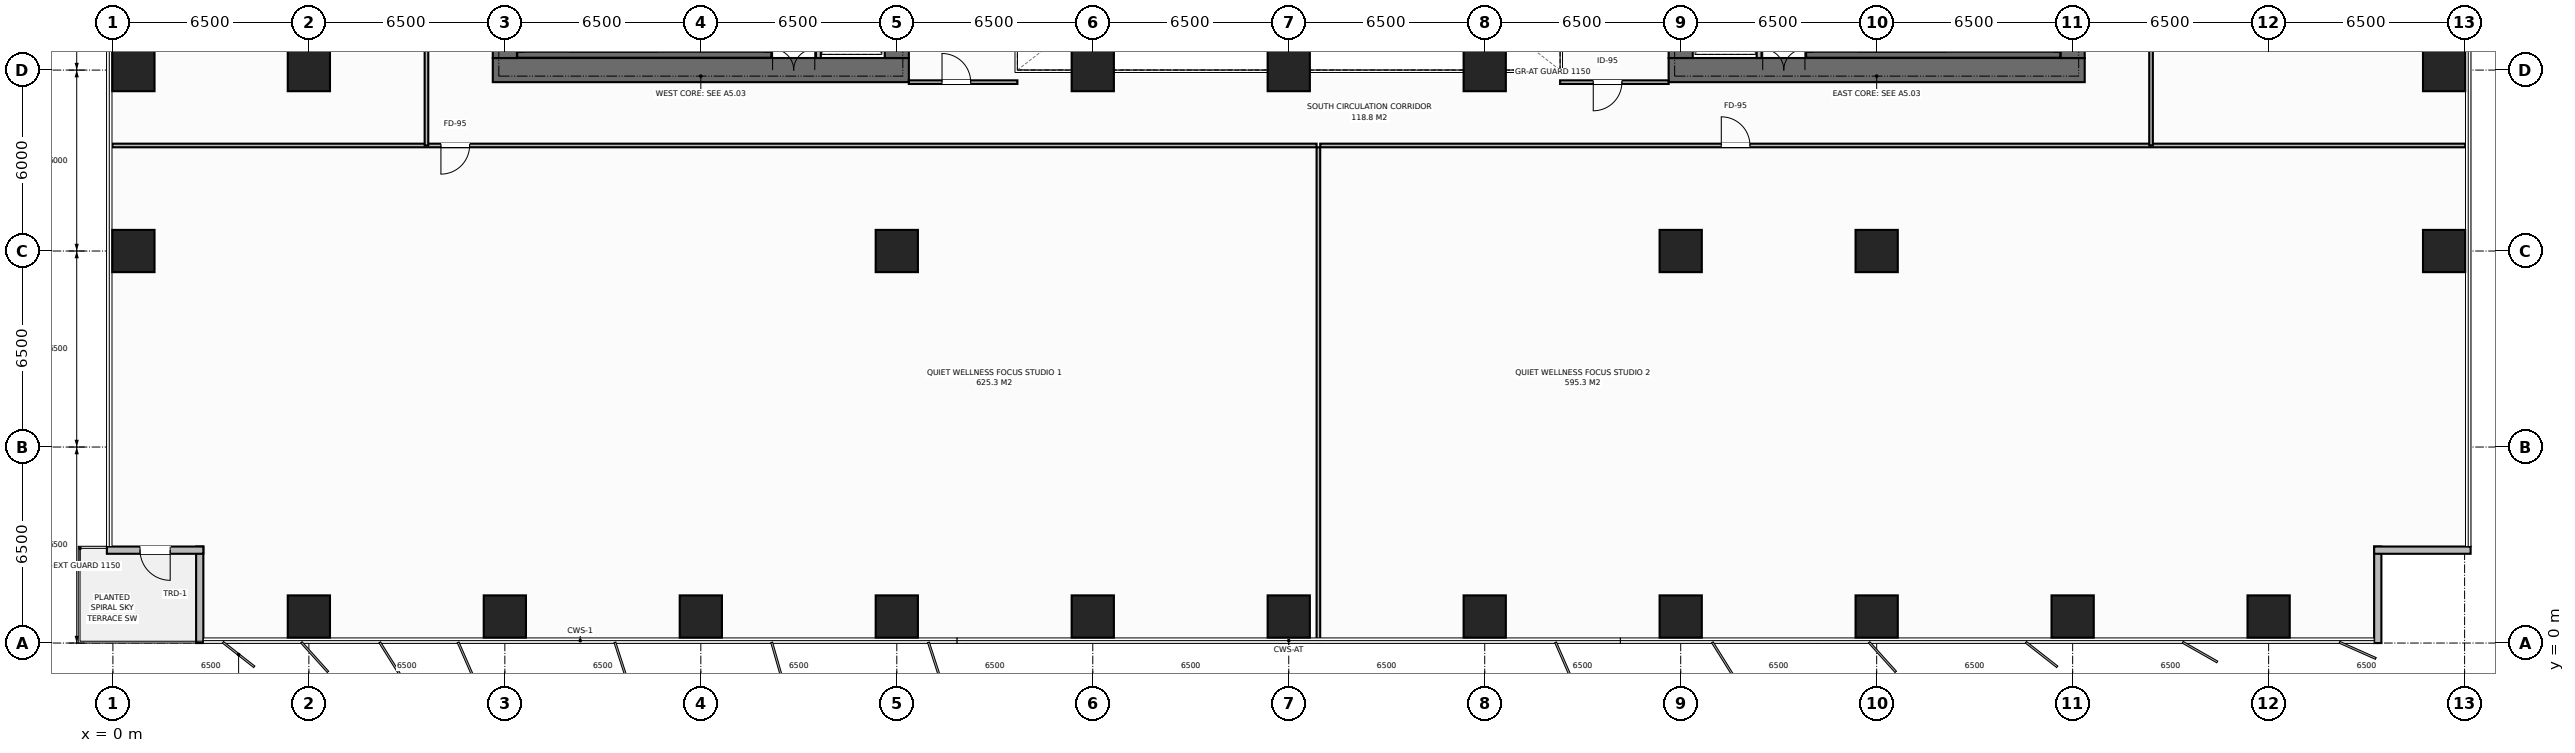
"""IFC4 building model, lengths in metres.
Left out: names, types, materials, properties, quantities, classifications, styles, units other than length and angle.
Written with IfcOpenShell. Run it as: python <this file> out.ifc"""

import sys

from ifc_helpers import new_model, si_unit, direction, frame, frame_2d, origin, origin_2d, place, context, subcontext, project, spatial, rectangle, extrude, element, fill, save


model = new_model("IFC4")
c1 = context("Model", 3, precision=1e-05, world=origin(), true_north=direction((0.0, 1.0)))
c2 = subcontext(c1, "Body", "Model", "MODEL_VIEW")
j1 = project(units=[si_unit("LENGTHUNIT", "METRE"), si_unit("PLANEANGLEUNIT", "RADIAN")], contexts=[c1])
p1 = place(None, origin())
s1 = spatial("IfcSite", under=j1, at=p1, CompositionType="ELEMENT")
p2 = place(p1, origin())
s2 = spatial("IfcBuilding", under=s1, at=p2, CompositionType="ELEMENT")
p3 = place(p2, frame((0.0, 0.0, 35.4)))
s3 = spatial("IfcBuildingStorey", under=s2, at=p3, CompositionType="ELEMENT", Elevation=35.4)
p4 = place(p3, frame((12.6, 19.0, 0.0), z_axis=(0.0, 0.0, 1.0), x_axis=(1.0, 0.0, 0.0)))
e1 = element("IfcWall", 1, at=p4, inside=s3, PredefinedType="SHEAR", context=c2, shape_type="SweptSolid", body=[
    extrude(rectangle(XDim=13.8, YDim=0.8, at=frame_2d((6.9, 0.0))), origin(), (0.0, 0.0, 1.0), 3.8),
])
p5 = place(p4, frame((9.28, 0.0, 0.0)))
e2 = element("IfcOpeningElement", 2, at=p5, cuts=e1, PredefinedType="OPENING", context=c2, shape_type="SweptSolid", body=[
    extrude(rectangle(XDim=1.4, YDim=2.2, at=frame_2d((0.7, 1.1))), frame((0.0, 0.41, 0.0), z_axis=(0.0, -1.0, 0.0), x_axis=(1.0, 0.0, 0.0)), (0.0, 0.0, 1.0), 0.82),
])
p6 = place(p3, frame((13.0, 19.4, 0.0), z_axis=(0.0, 0.0, 1.0), x_axis=(0.0, 1.0, 0.0)))
e3 = element("IfcWall", 3, at=p6, inside=s3, PredefinedType="SHEAR", context=c2, shape_type="SweptSolid", body=[
    extrude(rectangle(XDim=13.2, YDim=0.8, at=frame_2d((6.6, 0.0))), origin(), (0.0, 0.0, 1.0), 3.8),
])
p7 = place(p6, frame((4.65, 0.0, 0.0)))
e4 = element("IfcOpeningElement", 4, at=p7, cuts=e3, PredefinedType="OPENING", context=c2, shape_type="SweptSolid", body=[
    extrude(rectangle(XDim=1.4, YDim=2.2, at=frame_2d((0.7, 1.1))), frame((0.0, 0.41, 0.0), z_axis=(0.0, -1.0, 0.0), x_axis=(1.0, 0.0, 0.0)), (0.0, 0.0, 1.0), 0.82),
])
p8 = place(p3, frame((26.0, 19.4, 0.0), z_axis=(0.0, 0.0, 1.0), x_axis=(0.0, 1.0, 0.0)))
e5 = element("IfcWall", 5, at=p8, inside=s3, PredefinedType="SHEAR", context=c2, shape_type="SweptSolid", body=[
    extrude(rectangle(XDim=13.2, YDim=0.8, at=frame_2d((6.6, 0.0))), origin(), (0.0, 0.0, 1.0), 3.8),
])
p9 = place(p3, frame((51.6, 19.0, 0.0), z_axis=(0.0, 0.0, 1.0), x_axis=(1.0, 0.0, 0.0)))
e6 = element("IfcWall", 6, at=p9, inside=s3, PredefinedType="SHEAR", context=c2, shape_type="SweptSolid", body=[
    extrude(rectangle(XDim=13.8, YDim=0.8, at=frame_2d((6.9, 0.0))), origin(), (0.0, 0.0, 1.0), 3.8),
])
p10 = place(p9, frame((3.12, 0.0, 0.0)))
e7 = element("IfcOpeningElement", 7, at=p10, cuts=e6, PredefinedType="OPENING", context=c2, shape_type="SweptSolid", body=[
    extrude(rectangle(XDim=1.4, YDim=2.2, at=frame_2d((0.7, 1.1))), frame((0.0, 0.41, 0.0), z_axis=(0.0, -1.0, 0.0), x_axis=(1.0, 0.0, 0.0)), (0.0, 0.0, 1.0), 0.82),
])
p11 = place(p3, frame((52.0, 19.4, 0.0), z_axis=(0.0, 0.0, 1.0), x_axis=(0.0, 1.0, 0.0)))
e8 = element("IfcWall", 8, at=p11, inside=s3, PredefinedType="SHEAR", context=c2, shape_type="SweptSolid", body=[
    extrude(rectangle(XDim=13.2, YDim=0.8, at=frame_2d((6.6, 0.0))), origin(), (0.0, 0.0, 1.0), 3.8),
])
p12 = place(p3, frame((65.0, 19.4, 0.0), z_axis=(0.0, 0.0, 1.0), x_axis=(0.0, 1.0, 0.0)))
e9 = element("IfcWall", 9, at=p12, inside=s3, PredefinedType="SHEAR", context=c2, shape_type="SweptSolid", body=[
    extrude(rectangle(XDim=13.2, YDim=0.8, at=frame_2d((6.6, 0.0))), origin(), (0.0, 0.0, 1.0), 3.8),
])
p13 = place(p12, frame((8.05, 0.0, 0.0)))
e10 = element("IfcOpeningElement", 10, at=p13, cuts=e9, PredefinedType="OPENING", context=c2, shape_type="SweptSolid", body=[
    extrude(rectangle(XDim=1.3, YDim=2.2, at=frame_2d((0.65, 1.1))), frame((0.0, 0.41, 0.0), z_axis=(0.0, -1.0, 0.0), x_axis=(1.0, 0.0, 0.0)), (0.0, 0.0, 1.0), 0.82),
])
for number, where, z_axis, x_axis in (
    (11, (13.41, 19.51, 0.0), (0.0, 0.0, 1.0), (1.0, 0.0, 0.0)),
    (12, (56.16, 19.51, 0.0), (0.0, 0.0, 1.0), (1.0, 0.0, 0.0)),
):
    element("IfcWall", number, at=place(p3, frame(where, z_axis=z_axis, x_axis=x_axis)), inside=s3, PredefinedType="SHEAR", context=c2, shape_type="SweptSolid", body=[
        extrude(rectangle(XDim=8.43, YDim=0.2, at=frame_2d((4.215, 0.0))), origin(), (0.0, 0.0, 1.0), 3.8),
    ])
for number, where, z_axis, x_axis in (
    (13, (58.5, 13.0, 0.0), (0.0, 0.0, 1.0), (1.0, 0.0, 0.0)),
    (14, (6.5, 19.0, 0.0), (0.0, 0.0, 1.0), (1.0, 0.0, 0.0)),
    (15, (32.5, 19.0, 0.0), (0.0, 0.0, 1.0), (1.0, 0.0, 0.0)),
    (16, (39.0, 19.0, 0.0), (0.0, 0.0, 1.0), (1.0, 0.0, 0.0)),
    (17, (45.5, 19.0, 0.0), (0.0, 0.0, 1.0), (1.0, 0.0, 0.0)),
    (18, (26.0, 13.0, 0.0), (0.0, 0.0, 1.0), (1.0, 0.0, 0.0)),
    (19, (52.0, 13.0, 0.0), (0.0, 0.0, 1.0), (1.0, 0.0, 0.0)),
    (20, (6.5, 0.88, 0.0), (0.0, 0.0, 1.0), (1.0, 0.0, 0.0)),
    (21, (13.0, 0.88, 0.0), (0.0, 0.0, 1.0), (1.0, 0.0, 0.0)),
    (22, (19.5, 0.88, 0.0), (0.0, 0.0, 1.0), (1.0, 0.0, 0.0)),
    (23, (26.0, 0.88, 0.0), (0.0, 0.0, 1.0), (1.0, 0.0, 0.0)),
    (24, (32.5, 0.88, 0.0), (0.0, 0.0, 1.0), (1.0, 0.0, 0.0)),
    (25, (39.0, 0.88, 0.0), (0.0, 0.0, 1.0), (1.0, 0.0, 0.0)),
    (26, (45.5, 0.88, 0.0), (0.0, 0.0, 1.0), (1.0, 0.0, 0.0)),
    (27, (52.0, 0.88, 0.0), (0.0, 0.0, 1.0), (1.0, 0.0, 0.0)),
    (28, (58.5, 0.88, 0.0), (0.0, 0.0, 1.0), (1.0, 0.0, 0.0)),
    (29, (65.0, 0.88, 0.0), (0.0, 0.0, 1.0), (1.0, 0.0, 0.0)),
    (30, (71.5, 0.88, 0.0), (0.0, 0.0, 1.0), (1.0, 0.0, 0.0)),
    (31, (0.68, 13.0, 0.0), (0.0, 0.0, 1.0), (1.0, 0.0, 0.0)),
    (32, (77.32, 13.0, 0.0), (0.0, 0.0, 1.0), (1.0, 0.0, 0.0)),
    (33, (0.68, 19.0, 0.0), (0.0, 0.0, 1.0), (1.0, 0.0, 0.0)),
    (34, (77.32, 19.0, 0.0), (0.0, 0.0, 1.0), (1.0, 0.0, 0.0)),
):
    element("IfcColumn", number, at=place(p3, frame(where, z_axis=z_axis, x_axis=x_axis)), inside=s3, PredefinedType="COLUMN", context=c2, shape_type="SweptSolid", body=[
        extrude(rectangle(XDim=1.4, YDim=1.4, at=origin_2d()), origin(), (0.0, 0.0, 1.0), 3.8),
    ])
p14 = place(p3, frame((2.88, 0.0, 0.0), z_axis=(0.0, 0.0, 1.0), x_axis=(0.0, 1.0, 0.0)))
e35 = element("IfcWall", 35, at=p14, inside=s3, PredefinedType="STANDARD", context=c2, shape_type="SweptSolid", body=[
    extrude(rectangle(XDim=3.2, YDim=0.24, at=frame_2d((1.6, 0.0))), origin(), (0.0, 0.0, 1.0), 3.55),
])
p15 = place(p3, frame((3.0, 3.08, 0.0), z_axis=(0.0, 0.0, 1.0), x_axis=(-1.0, 0.0, 0.0)))
e36 = element("IfcWall", 36, at=p15, inside=s3, PredefinedType="STANDARD", context=c2, shape_type="SweptSolid", body=[
    extrude(rectangle(XDim=3.2, YDim=0.24, at=frame_2d((1.6, 0.0))), origin(), (0.0, 0.0, 1.0), 3.55),
])
p16 = place(p15, frame((1.1, 0.0, 0.0)))
e37 = element("IfcOpeningElement", 37, at=p16, cuts=e36, PredefinedType="OPENING", context=c2, shape_type="SweptSolid", body=[
    extrude(rectangle(XDim=1.0, YDim=2.2, at=frame_2d((0.5, 1.1))), frame((0.0, 0.13, 0.0), z_axis=(0.0, -1.0, 0.0), x_axis=(1.0, 0.0, 0.0)), (0.0, 0.0, 1.0), 0.26),
])
for number, where, z_axis, x_axis in (
    (38, (75.12, 3.2, 0.0), (0.0, 0.0, 1.0), (0.0, -1.0, 0.0)),
    (39, (78.2, 3.08, 0.0), (0.0, 0.0, 1.0), (-1.0, 0.0, 0.0)),
):
    element("IfcWall", number, at=place(p3, frame(where, z_axis=z_axis, x_axis=x_axis)), inside=s3, PredefinedType="STANDARD", context=c2, shape_type="SweptSolid", body=[
        extrude(rectangle(XDim=3.2, YDim=0.24, at=frame_2d((1.6, 0.0))), origin(), (0.0, 0.0, 1.0), 3.55),
    ])
p17 = place(p3, frame((23.4, 19.4, 0.0), z_axis=(0.0, 0.0, 1.0), x_axis=(0.0, 1.0, 0.0)))
e40 = element("IfcWall", 40, at=p17, inside=s3, PredefinedType="STANDARD", context=c2, shape_type="SweptSolid", body=[
    extrude(rectangle(XDim=13.2, YDim=0.16, at=frame_2d((6.6, 0.0))), origin(), (0.0, 0.0, 1.0), 3.55),
])
p18 = place(p17, frame((0.55, 0.0, 0.0)))
e41 = element("IfcOpeningElement", 41, at=p18, cuts=e40, PredefinedType="OPENING", context=c2, shape_type="SweptSolid", body=[
    extrude(rectangle(XDim=1.1, YDim=2.2, at=frame_2d((0.55, 1.1))), frame((0.0, 0.09, 0.0), z_axis=(0.0, -1.0, 0.0), x_axis=(1.0, 0.0, 0.0)), (0.0, 0.0, 1.0), 0.18),
])
p19 = place(p17, frame((2.7, 0.0, 0.0)))
e42 = element("IfcOpeningElement", 42, at=p19, cuts=e40, PredefinedType="OPENING", context=c2, shape_type="SweptSolid", body=[
    extrude(rectangle(XDim=1.1, YDim=2.2, at=frame_2d((0.55, 1.1))), frame((0.0, 0.09, 0.0), z_axis=(0.0, -1.0, 0.0), x_axis=(1.0, 0.0, 0.0)), (0.0, 0.0, 1.0), 0.18),
])
p20 = place(p3, frame((54.6, 19.4, 0.0), z_axis=(0.0, 0.0, 1.0), x_axis=(0.0, 1.0, 0.0)))
e43 = element("IfcWall", 43, at=p20, inside=s3, PredefinedType="STANDARD", context=c2, shape_type="SweptSolid", body=[
    extrude(rectangle(XDim=13.2, YDim=0.16, at=frame_2d((6.6, 0.0))), origin(), (0.0, 0.0, 1.0), 3.55),
])
p21 = place(p20, frame((0.55, 0.0, 0.0)))
e44 = element("IfcOpeningElement", 44, at=p21, cuts=e43, PredefinedType="OPENING", context=c2, shape_type="SweptSolid", body=[
    extrude(rectangle(XDim=1.1, YDim=2.2, at=frame_2d((0.55, 1.1))), frame((0.0, 0.09, 0.0), z_axis=(0.0, -1.0, 0.0), x_axis=(1.0, 0.0, 0.0)), (0.0, 0.0, 1.0), 0.18),
])
p22 = place(p20, frame((2.7, 0.0, 0.0)))
e45 = element("IfcOpeningElement", 45, at=p22, cuts=e43, PredefinedType="OPENING", context=c2, shape_type="SweptSolid", body=[
    extrude(rectangle(XDim=1.1, YDim=2.2, at=frame_2d((0.55, 1.1))), frame((0.0, 0.09, 0.0), z_axis=(0.0, -1.0, 0.0), x_axis=(1.0, 0.0, 0.0)), (0.0, 0.0, 1.0), 0.18),
])
p23 = place(p3, frame((26.4, 18.6, 0.0), z_axis=(0.0, 0.0, 1.0), x_axis=(1.0, 0.0, 0.0)))
e46 = element("IfcWall", 46, at=p23, inside=s3, PredefinedType="PARTITIONING", context=c2, shape_type="SweptSolid", body=[
    extrude(rectangle(XDim=3.6, YDim=0.12, at=frame_2d((1.8, 0.0))), origin(), (0.0, 0.0, 1.0), 3.55),
])
p24 = place(p23, frame((1.1, 0.0, 0.0)))
e47 = element("IfcOpeningElement", 47, at=p24, cuts=e46, PredefinedType="OPENING", context=c2, shape_type="SweptSolid", body=[
    extrude(rectangle(XDim=0.95, YDim=2.15, at=frame_2d((0.475, 1.075))), frame((0.0, 0.07, 0.0), z_axis=(0.0, -1.0, 0.0), x_axis=(1.0, 0.0, 0.0)), (0.0, 0.0, 1.0), 0.14),
])
p25 = place(p3, frame((48.0, 18.6, 0.0), z_axis=(0.0, 0.0, 1.0), x_axis=(1.0, 0.0, 0.0)))
e48 = element("IfcWall", 48, at=p25, inside=s3, PredefinedType="PARTITIONING", context=c2, shape_type="SweptSolid", body=[
    extrude(rectangle(XDim=3.6, YDim=0.12, at=frame_2d((1.8, 0.0))), origin(), (0.0, 0.0, 1.0), 3.55),
])
p26 = place(p25, frame((1.1, 0.0, 0.0)))
e49 = element("IfcOpeningElement", 49, at=p26, cuts=e48, PredefinedType="OPENING", context=c2, shape_type="SweptSolid", body=[
    extrude(rectangle(XDim=0.95, YDim=2.15, at=frame_2d((0.475, 1.075))), frame((0.0, 0.07, 0.0), z_axis=(0.0, -1.0, 0.0), x_axis=(1.0, 0.0, 0.0)), (0.0, 0.0, 1.0), 0.14),
])
p27 = place(p3, frame((39.983, 0.02, 0.0), z_axis=(0.0, 0.0, 1.0), x_axis=(0.0, 1.0, 0.0)))
e50 = element("IfcWall", 50, at=p27, inside=s3, PredefinedType="PARTITIONING", context=c2, shape_type="SweptSolid", body=[
    extrude(rectangle(XDim=16.42, YDim=0.12, at=frame_2d((8.21, 0.0))), origin(), (0.0, 0.0, 1.0), 3.55),
])
p28 = place(p3, frame((-0.02, 16.5, 0.0), z_axis=(0.0, 0.0, 1.0), x_axis=(1.0, 0.0, 0.0)))
e51 = element("IfcWall", 51, at=p28, inside=s3, PredefinedType="PARTITIONING", context=c2, shape_type="SweptSolid", body=[
    extrude(rectangle(XDim=39.943, YDim=0.12, at=frame_2d((19.972, 0.0))), origin(), (0.0, 0.0, 1.0), 3.55),
])
p29 = place(p28, frame((10.9, 0.0, 0.0)))
e52 = element("IfcOpeningElement", 52, at=p29, cuts=e51, PredefinedType="OPENING", context=c2, shape_type="SweptSolid", body=[
    extrude(rectangle(XDim=0.95, YDim=2.15, at=frame_2d((0.475, 1.075))), frame((0.0, 0.07, 0.0), z_axis=(0.0, -1.0, 0.0), x_axis=(1.0, 0.0, 0.0)), (0.0, 0.0, 1.0), 0.14),
])
p30 = place(p3, frame((40.043, 16.5, 0.0), z_axis=(0.0, 0.0, 1.0), x_axis=(1.0, 0.0, 0.0)))
e53 = element("IfcWall", 53, at=p30, inside=s3, PredefinedType="PARTITIONING", context=c2, shape_type="SweptSolid", body=[
    extrude(rectangle(XDim=37.977, YDim=0.12, at=frame_2d((18.988, 0.0))), origin(), (0.0, 0.0, 1.0), 3.55),
])
p31 = place(p30, frame((13.303, 0.0, 0.0)))
e54 = element("IfcOpeningElement", 54, at=p31, cuts=e53, PredefinedType="OPENING", context=c2, shape_type="SweptSolid", body=[
    extrude(rectangle(XDim=0.95, YDim=2.15, at=frame_2d((0.475, 1.075))), frame((0.0, 0.07, 0.0), z_axis=(0.0, -1.0, 0.0), x_axis=(1.0, 0.0, 0.0)), (0.0, 0.0, 1.0), 0.14),
])
p32 = place(p3, frame((10.4, 16.5, 0.0), z_axis=(0.0, 0.0, 1.0), x_axis=(0.0, 1.0, 0.0)))
e55 = element("IfcWall", 55, at=p32, inside=s3, PredefinedType="PARTITIONING", context=c2, shape_type="SweptSolid", body=[
    extrude(rectangle(XDim=19.0, YDim=0.12, at=frame_2d((9.5, 0.0))), origin(), (0.0, 0.0, 1.0), 3.55),
])
p33 = place(p32, frame((9.025, 0.0, 0.0)))
e56 = element("IfcOpeningElement", 56, at=p33, cuts=e55, PredefinedType="OPENING", context=c2, shape_type="SweptSolid", body=[
    extrude(rectangle(XDim=0.95, YDim=2.15, at=frame_2d((0.475, 1.075))), frame((0.0, 0.07, 0.0), z_axis=(0.0, -1.0, 0.0), x_axis=(1.0, 0.0, 0.0)), (0.0, 0.0, 1.0), 0.14),
])
p34 = place(p3, frame((67.6, 16.5, 0.0), z_axis=(0.0, 0.0, 1.0), x_axis=(0.0, 1.0, 0.0)))
e57 = element("IfcWall", 57, at=p34, inside=s3, PredefinedType="PARTITIONING", context=c2, shape_type="SweptSolid", body=[
    extrude(rectangle(XDim=9.5, YDim=0.12, at=frame_2d((4.75, 0.0))), origin(), (0.0, 0.0, 1.0), 3.55),
])
p35 = place(p34, frame((5.325, 0.0, 0.0)))
e58 = element("IfcOpeningElement", 58, at=p35, cuts=e57, PredefinedType="OPENING", context=c2, shape_type="SweptSolid", body=[
    extrude(rectangle(XDim=0.95, YDim=2.15, at=frame_2d((0.475, 1.075))), frame((0.0, 0.07, 0.0), z_axis=(0.0, -1.0, 0.0), x_axis=(1.0, 0.0, 0.0)), (0.0, 0.0, 1.0), 0.14),
])
p36 = place(p16, origin())
e59 = element("IfcDoor", 59, at=p36, inside=s3, OperationType="SINGLE_SWING_LEFT", PredefinedType="DOOR", context=c2, shape_type="SweptSolid", body=[
    extrude(rectangle(XDim=1.0, YDim=2.2, at=frame_2d((0.5, 1.1))), frame((0.0, 0.025, 0.0), z_axis=(0.0, -1.0, 0.0), x_axis=(1.0, 0.0, 0.0)), (0.0, 0.0, 1.0), 0.05),
])
fill(e37, e59)
p37 = place(p5, origin())
e60 = element("IfcDoor", 60, at=p37, inside=s3, OperationType="DOUBLE_DOOR_SINGLE_SWING", PredefinedType="DOOR", context=c2, shape_type="SweptSolid", body=[
    extrude(rectangle(XDim=1.4, YDim=2.2, at=frame_2d((0.7, 1.1))), frame((0.0, 0.125, 0.0), z_axis=(0.0, -1.0, 0.0), x_axis=(1.0, 0.0, 0.0)), (0.0, 0.0, 1.0), 0.05),
])
fill(e2, e60)
p38 = place(p10, origin())
e61 = element("IfcDoor", 61, at=p38, inside=s3, OperationType="DOUBLE_DOOR_SINGLE_SWING", PredefinedType="DOOR", context=c2, shape_type="SweptSolid", body=[
    extrude(rectangle(XDim=1.4, YDim=2.2, at=frame_2d((0.7, 1.1))), frame((0.0, 0.125, 0.0), z_axis=(0.0, -1.0, 0.0), x_axis=(1.0, 0.0, 0.0)), (0.0, 0.0, 1.0), 0.05),
])
fill(e7, e61)
p39 = place(p24, origin())
e62 = element("IfcDoor", 62, at=p39, inside=s3, OperationType="SINGLE_SWING_LEFT", PredefinedType="DOOR", context=c2, shape_type="SweptSolid", body=[
    extrude(rectangle(XDim=0.95, YDim=2.15, at=frame_2d((0.475, 1.075))), frame((0.0, 0.025, 0.0), z_axis=(0.0, -1.0, 0.0), x_axis=(1.0, 0.0, 0.0)), (0.0, 0.0, 1.0), 0.05),
])
fill(e47, e62)
p40 = place(p26, origin())
e63 = element("IfcDoor", 63, at=p40, inside=s3, OperationType="SINGLE_SWING_RIGHT", PredefinedType="DOOR", context=c2, shape_type="SweptSolid", body=[
    extrude(rectangle(XDim=0.95, YDim=2.15, at=frame_2d((0.475, 1.075))), frame((0.0, 0.025, 0.0), z_axis=(0.0, -1.0, 0.0), x_axis=(1.0, 0.0, 0.0)), (0.0, 0.0, 1.0), 0.05),
])
fill(e49, e63)
p41 = place(p29, origin())
e64 = element("IfcDoor", 64, at=p41, inside=s3, OperationType="SINGLE_SWING_RIGHT", PredefinedType="DOOR", context=c2, shape_type="SweptSolid", body=[
    extrude(rectangle(XDim=0.95, YDim=2.15, at=frame_2d((0.475, 1.075))), frame((0.0, 0.025, 0.0), z_axis=(0.0, -1.0, 0.0), x_axis=(1.0, 0.0, 0.0)), (0.0, 0.0, 1.0), 0.05),
])
fill(e52, e64)
p42 = place(p31, origin())
e65 = element("IfcDoor", 65, at=p42, inside=s3, OperationType="SINGLE_SWING_LEFT", PredefinedType="DOOR", context=c2, shape_type="SweptSolid", body=[
    extrude(rectangle(XDim=0.95, YDim=2.15, at=frame_2d((0.475, 1.075))), frame((0.0, 0.025, 0.0), z_axis=(0.0, -1.0, 0.0), x_axis=(1.0, 0.0, 0.0)), (0.0, 0.0, 1.0), 0.05),
])
fill(e54, e65)
save(model, sys.argv[1])
